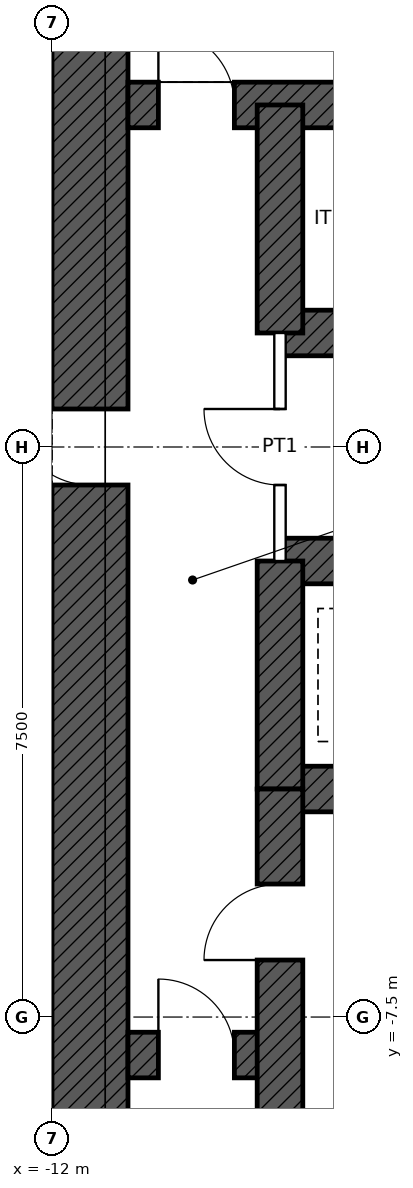
"""IFC4 building model, lengths in metres.
Left out: names, types, materials, properties, quantities, classifications, styles, units other than length and angle.
Written with IfcOpenShell. Run it as: python <this file> out.ifc"""

import sys

from ifc_helpers import new_model, si_unit, direction, frame, frame_2d, origin, place, context, subcontext, project, spatial, rectangle, extrude, element, fill, save


model = new_model("IFC4")
c1 = context("Model", 3, precision=1e-05, world=origin(), true_north=direction((0.0, 1.0)))
c2 = subcontext(c1, "Body", "Model", "MODEL_VIEW")
j1 = project(units=[si_unit("LENGTHUNIT", "METRE"), si_unit("PLANEANGLEUNIT", "RADIAN")], contexts=[c1])
p1 = place(None, origin())
s1 = spatial("IfcSite", under=j1, at=p1, CompositionType="ELEMENT")
p2 = place(p1, origin())
s2 = spatial("IfcBuilding", under=s1, at=p2, CompositionType="ELEMENT")
p3 = place(p2, frame((0.0, 0.0, 7.2)))
s3 = spatial("IfcBuildingStorey", under=s2, at=p3, CompositionType="ELEMENT", Elevation=7.2)
p4 = place(p3, frame((-11.5, -11.0, 0.0), z_axis=(0.0, 0.0, 1.0), x_axis=(0.0, 1.0, 0.0)))
e1 = element("IfcWall", 1, at=p4, inside=s3, PredefinedType="SHEAR", context=c2, shape_type="SweptSolid", body=[
    extrude(rectangle(XDim=22.0, YDim=1.0, at=frame_2d((11.0, 0.0))), origin(), (0.0, 0.0, 1.0), 5.4),
])
p5 = place(p4, frame((10.5, 0.0, 0.0)))
e2 = element("IfcOpeningElement", 2, at=p5, cuts=e1, PredefinedType="OPENING", context=c2, shape_type="SweptSolid", body=[
    extrude(rectangle(XDim=1.0, YDim=2.4, at=frame_2d((0.5, 1.2))), frame((0.0, 0.51, 0.0), z_axis=(0.0, -1.0, 0.0), x_axis=(1.0, 0.0, 0.0)), (0.0, 0.0, 1.0), 1.02),
])
p6 = place(p3, frame((-11.0, 4.5, 0.0), z_axis=(0.0, 0.0, 1.0), x_axis=(1.0, 0.0, 0.0)))
e3 = element("IfcWall", 3, at=p6, inside=s3, PredefinedType="SHEAR", context=c2, shape_type="SweptSolid", body=[
    extrude(rectangle(XDim=22.0, YDim=0.6, at=frame_2d((11.0, 0.0))), origin(), (0.0, 0.0, 1.0), 5.4),
])
p7 = place(p6, frame((0.4, 0.0, 0.0)))
e4 = element("IfcOpeningElement", 4, at=p7, cuts=e3, PredefinedType="OPENING", context=c2, shape_type="SweptSolid", body=[
    extrude(rectangle(XDim=1.0, YDim=2.1, at=frame_2d((0.5, 1.05))), frame((0.0, 0.31, 0.0), z_axis=(0.0, -1.0, 0.0), x_axis=(1.0, 0.0, 0.0)), (0.0, 0.0, 1.0), 0.62),
])
p8 = place(p6, frame((20.6, 0.0, 0.0)))
e5 = element("IfcOpeningElement", 5, at=p8, cuts=e3, PredefinedType="OPENING", context=c2, shape_type="SweptSolid", body=[
    extrude(rectangle(XDim=1.0, YDim=2.1, at=frame_2d((0.5, 1.05))), frame((0.0, 0.31, 0.0), z_axis=(0.0, -1.0, 0.0), x_axis=(1.0, 0.0, 0.0)), (0.0, 0.0, 1.0), 0.62),
])
p9 = place(p3, frame((-9.0, 1.5, 0.0), z_axis=(0.0, 0.0, 1.0), x_axis=(1.0, 0.0, 0.0)))
e6 = element("IfcWall", 6, at=p9, inside=s3, PredefinedType="SHEAR", context=c2, shape_type="SweptSolid", body=[
    extrude(rectangle(XDim=18.0, YDim=0.6, at=frame_2d((9.0, 0.0))), origin(), (0.0, 0.0, 1.0), 5.4),
])
p10 = place(p9, frame((9.95, 0.0, 0.0)))
e7 = element("IfcOpeningElement", 7, at=p10, cuts=e6, PredefinedType="OPENING", context=c2, shape_type="SweptSolid", body=[
    extrude(rectangle(XDim=1.1, YDim=2.1, at=frame_2d((0.55, 1.05))), frame((0.0, 0.31, 0.0), z_axis=(0.0, -1.0, 0.0), x_axis=(1.0, 0.0, 0.0)), (0.0, 0.0, 1.0), 0.62),
])
p11 = place(p9, frame((12.95, 0.0, 0.0)))
e8 = element("IfcOpeningElement", 8, at=p11, cuts=e6, PredefinedType="OPENING", context=c2, shape_type="SweptSolid", body=[
    extrude(rectangle(XDim=1.1, YDim=2.1, at=frame_2d((0.55, 1.05))), frame((0.0, 0.31, 0.0), z_axis=(0.0, -1.0, 0.0), x_axis=(1.0, 0.0, 0.0)), (0.0, 0.0, 1.0), 0.62),
])
p12 = place(p9, frame((15.95, 0.0, 0.0)))
e9 = element("IfcOpeningElement", 9, at=p12, cuts=e6, PredefinedType="OPENING", context=c2, shape_type="SweptSolid", body=[
    extrude(rectangle(XDim=1.1, YDim=2.1, at=frame_2d((0.55, 1.05))), frame((0.0, 0.31, 0.0), z_axis=(0.0, -1.0, 0.0), x_axis=(1.0, 0.0, 0.0)), (0.0, 0.0, 1.0), 0.62),
])
p13 = place(p9, frame((0.95, 0.0, 0.0)))
e10 = element("IfcOpeningElement", 10, at=p13, cuts=e6, PredefinedType="OPENING", context=c2, shape_type="SweptSolid", body=[
    extrude(rectangle(XDim=1.1, YDim=2.1, at=frame_2d((0.55, 1.05))), frame((0.0, 0.31, 0.0), z_axis=(0.0, -1.0, 0.0), x_axis=(1.0, 0.0, 0.0)), (0.0, 0.0, 1.0), 0.62),
])
p14 = place(p9, frame((3.95, 0.0, 0.0)))
e11 = element("IfcOpeningElement", 11, at=p14, cuts=e6, PredefinedType="OPENING", context=c2, shape_type="SweptSolid", body=[
    extrude(rectangle(XDim=1.1, YDim=2.1, at=frame_2d((0.55, 1.05))), frame((0.0, 0.31, 0.0), z_axis=(0.0, -1.0, 0.0), x_axis=(1.0, 0.0, 0.0)), (0.0, 0.0, 1.0), 0.62),
])
p15 = place(p9, frame((6.95, 0.0, 0.0)))
e12 = element("IfcOpeningElement", 12, at=p15, cuts=e6, PredefinedType="OPENING", context=c2, shape_type="SweptSolid", body=[
    extrude(rectangle(XDim=1.1, YDim=2.1, at=frame_2d((0.55, 1.05))), frame((0.0, 0.31, 0.0), z_axis=(0.0, -1.0, 0.0), x_axis=(1.0, 0.0, 0.0)), (0.0, 0.0, 1.0), 0.62),
])
for number, where, z_axis, x_axis in (
    (13, (-9.0, -1.5, 0.0), (0.0, 0.0, 1.0), (1.0, 0.0, 0.0)),
    (14, (-9.0, -4.5, 0.0), (0.0, 0.0, 1.0), (1.0, 0.0, 0.0)),
):
    element("IfcWall", number, at=place(p3, frame(where, z_axis=z_axis, x_axis=x_axis)), inside=s3, PredefinedType="SHEAR", context=c2, shape_type="SweptSolid", body=[
        extrude(rectangle(XDim=18.0, YDim=0.6, at=frame_2d((9.0, 0.0))), origin(), (0.0, 0.0, 1.0), 5.4),
    ])
p16 = place(p3, frame((-11.0, -8.0, 0.0), z_axis=(0.0, 0.0, 1.0), x_axis=(1.0, 0.0, 0.0)))
e15 = element("IfcWall", 15, at=p16, inside=s3, PredefinedType="SHEAR", context=c2, shape_type="SweptSolid", body=[
    extrude(rectangle(XDim=2.0, YDim=0.6, at=frame_2d((1.0, 0.0))), origin(), (0.0, 0.0, 1.0), 5.4),
])
p17 = place(p16, frame((0.4, 0.0, 0.0)))
e16 = element("IfcOpeningElement", 16, at=p17, cuts=e15, PredefinedType="OPENING", context=c2, shape_type="SweptSolid", body=[
    extrude(rectangle(XDim=1.0, YDim=2.1, at=frame_2d((0.5, 1.05))), frame((0.0, 0.31, 0.0), z_axis=(0.0, -1.0, 0.0), x_axis=(1.0, 0.0, 0.0)), (0.0, 0.0, 1.0), 0.62),
])
for number, where, z_axis, x_axis in (
    (17, (-9.0, 1.5, 0.0), (0.0, 0.0, 1.0), (0.0, 1.0, 0.0)),
    (18, (-9.0, -4.5, 0.0), (0.0, 0.0, 1.0), (0.0, 1.0, 0.0)),
):
    element("IfcWall", number, at=place(p3, frame(where, z_axis=z_axis, x_axis=x_axis)), inside=s3, PredefinedType="SHEAR", context=c2, shape_type="SweptSolid", body=[
        extrude(rectangle(XDim=3.0, YDim=0.6, at=frame_2d((1.5, 0.0))), origin(), (0.0, 0.0, 1.0), 5.4),
    ])
p18 = place(p3, frame((-9.0, -11.0, 0.0), z_axis=(0.0, 0.0, 1.0), x_axis=(0.0, 1.0, 0.0)))
e19 = element("IfcWall", 19, at=p18, inside=s3, PredefinedType="SHEAR", context=c2, shape_type="SweptSolid", body=[
    extrude(rectangle(XDim=6.5, YDim=0.6, at=frame_2d((3.25, 0.0))), origin(), (0.0, 0.0, 1.0), 5.4),
])
p19 = place(p18, frame((4.25, 0.0, 0.0)))
e20 = element("IfcOpeningElement", 20, at=p19, cuts=e19, PredefinedType="OPENING", context=c2, shape_type="SweptSolid", body=[
    extrude(rectangle(XDim=1.0, YDim=2.1, at=frame_2d((0.5, 1.05))), frame((0.0, 0.31, 0.0), z_axis=(0.0, -1.0, 0.0), x_axis=(1.0, 0.0, 0.0)), (0.0, 0.0, 1.0), 0.62),
])
p20 = place(p3, frame((-9.0, -1.5, 0.0), z_axis=(0.0, 0.0, 1.0), x_axis=(0.0, 1.0, 0.0)))
e21 = element("IfcWall", 21, at=p20, inside=s3, PredefinedType="PARTITIONING", context=c2, shape_type="SweptSolid", body=[
    extrude(rectangle(XDim=3.0, YDim=0.15, at=frame_2d((1.5, 0.0))), origin(), (0.0, 0.0, 1.0), 5.15),
])
p21 = place(p20, frame((1.0, 0.0, 0.0)))
e22 = element("IfcOpeningElement", 22, at=p21, cuts=e21, PredefinedType="OPENING", context=c2, shape_type="SweptSolid", body=[
    extrude(rectangle(XDim=1.0, YDim=2.4, at=frame_2d((0.5, 1.2))), frame((0.0, 0.085, 0.0), z_axis=(0.0, -1.0, 0.0), x_axis=(1.0, 0.0, 0.0)), (0.0, 0.0, 1.0), 0.17),
])
p22 = place(p7, origin())
e23 = element("IfcDoor", 23, at=p22, inside=s3, OperationType="SINGLE_SWING_LEFT", PredefinedType="DOOR", context=c2, shape_type="SweptSolid", body=[
    extrude(rectangle(XDim=1.0, YDim=2.1, at=frame_2d((0.5, 1.05))), frame((0.0, 0.025, 0.0), z_axis=(0.0, -1.0, 0.0), x_axis=(1.0, 0.0, 0.0)), (0.0, 0.0, 1.0), 0.05),
])
fill(e4, e23)
p23 = place(p5, origin())
e24 = element("IfcDoor", 24, at=p23, inside=s3, OperationType="SINGLE_SWING_RIGHT", PredefinedType="DOOR", context=c2, shape_type="SweptSolid", body=[
    extrude(rectangle(XDim=1.0, YDim=2.4, at=frame_2d((0.5, 1.2))), frame((0.0, 0.485, 0.0), z_axis=(0.0, -1.0, 0.0), x_axis=(1.0, 0.0, 0.0)), (0.0, 0.0, 1.0), 0.05),
])
fill(e2, e24)
p24 = place(p19, origin())
e25 = element("IfcDoor", 25, at=p24, inside=s3, OperationType="SINGLE_SWING_LEFT", PredefinedType="DOOR", context=c2, shape_type="SweptSolid", body=[
    extrude(rectangle(XDim=1.0, YDim=2.1, at=frame_2d((0.5, 1.05))), frame((0.0, 0.025, 0.0), z_axis=(0.0, -1.0, 0.0), x_axis=(1.0, 0.0, 0.0)), (0.0, 0.0, 1.0), 0.05),
])
fill(e20, e25)
p25 = place(p17, origin())
e26 = element("IfcDoor", 26, at=p25, inside=s3, OperationType="SINGLE_SWING_LEFT", PredefinedType="DOOR", context=c2, shape_type="SweptSolid", body=[
    extrude(rectangle(XDim=1.0, YDim=2.1, at=frame_2d((0.5, 1.05))), frame((0.0, 0.025, 0.0), z_axis=(0.0, -1.0, 0.0), x_axis=(1.0, 0.0, 0.0)), (0.0, 0.0, 1.0), 0.05),
])
fill(e16, e26)
p26 = place(p21, origin())
e27 = element("IfcDoor", 27, at=p26, inside=s3, OperationType="SINGLE_SWING_RIGHT", PredefinedType="DOOR", context=c2, shape_type="SweptSolid", body=[
    extrude(rectangle(XDim=1.0, YDim=2.4, at=frame_2d((0.5, 1.2))), frame((0.0, 0.025, 0.0), z_axis=(0.0, -1.0, 0.0), x_axis=(1.0, 0.0, 0.0)), (0.0, 0.0, 1.0), 0.05),
])
fill(e22, e27)
save(model, sys.argv[1])
